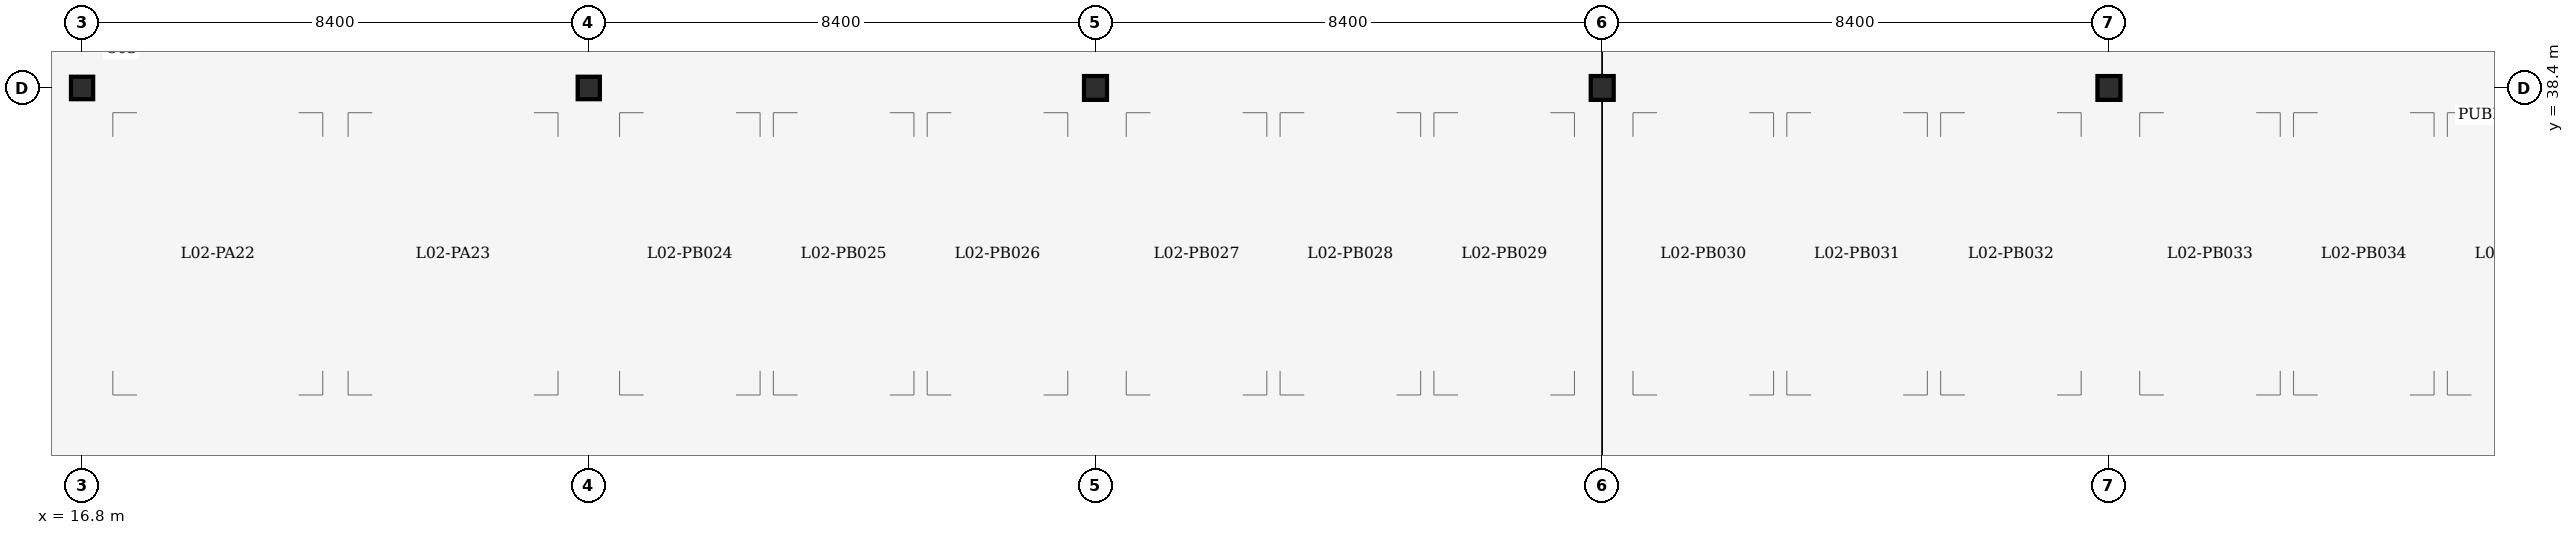
"""IFC4 building model, lengths in metres.
Left out: names, types, materials, properties, quantities, classifications, styles, units other than length and angle.
Written with IfcOpenShell. Run it as: python <this file> out.ifc"""

import sys

from ifc_helpers import new_model, si_unit, direction, frame, origin, origin_2d, place, context, subcontext, project, spatial, i_section, extrude, element, save


model = new_model("IFC4")
c1 = context("Model", 3, precision=1e-05, world=origin(), true_north=direction((0.0, 1.0)))
c2 = subcontext(c1, "Body", "Model", "MODEL_VIEW")
j1 = project(units=[si_unit("LENGTHUNIT", "METRE"), si_unit("PLANEANGLEUNIT", "RADIAN")], contexts=[c1])
p1 = place(None, origin())
s1 = spatial("IfcSite", under=j1, at=p1, CompositionType="ELEMENT")
p2 = place(p1, origin())
s2 = spatial("IfcBuilding", under=s1, at=p2, CompositionType="ELEMENT")
p3 = place(p2, frame((0.0, 0.0, 9.0)))
s3 = spatial("IfcBuildingStorey", under=s2, at=p3, CompositionType="ELEMENT", Elevation=9.0)
for number, where, z_axis, x_axis in (
    (1, (16.8, 38.4, 0.0), (0.0, 0.0, 1.0), (1.0, 0.0, 0.0)),
    (2, (25.2, 38.4, 0.0), (0.0, 0.0, 1.0), (1.0, 0.0, 0.0)),
):
    element("IfcColumn", number, at=place(p3, frame(where, z_axis=z_axis, x_axis=x_axis)), inside=s3, PredefinedType="COLUMN", context=c2, shape_type="SweptSolid", body=[
        extrude(i_section(OverallWidth=0.373, OverallDepth=0.368, WebThickness=0.014, FlangeThickness=0.024, FilletRadius=0.015, at=origin_2d()), origin(), (0.0, 0.0, 1.0), 3.6),
    ])
for number, where, z_axis, x_axis in (
    (3, (33.6, 38.4, 0.0), (0.0, 0.0, 1.0), (1.0, 0.0, 0.0)),
    (4, (42.0, 38.4, 0.0), (0.0, 0.0, 1.0), (1.0, 0.0, 0.0)),
    (5, (50.4, 38.4, 0.0), (0.0, 0.0, 1.0), (1.0, 0.0, 0.0)),
):
    element("IfcColumn", number, at=place(p3, frame(where, z_axis=z_axis, x_axis=x_axis)), inside=s3, PredefinedType="COLUMN", context=c2, shape_type="SweptSolid", body=[
        extrude(i_section(OverallWidth=0.395, OverallDepth=0.381, WebThickness=0.018, FlangeThickness=0.03, FilletRadius=0.015, at=origin_2d()), origin(), (0.0, 0.0, 1.0), 3.6),
    ])
save(model, sys.argv[1])
